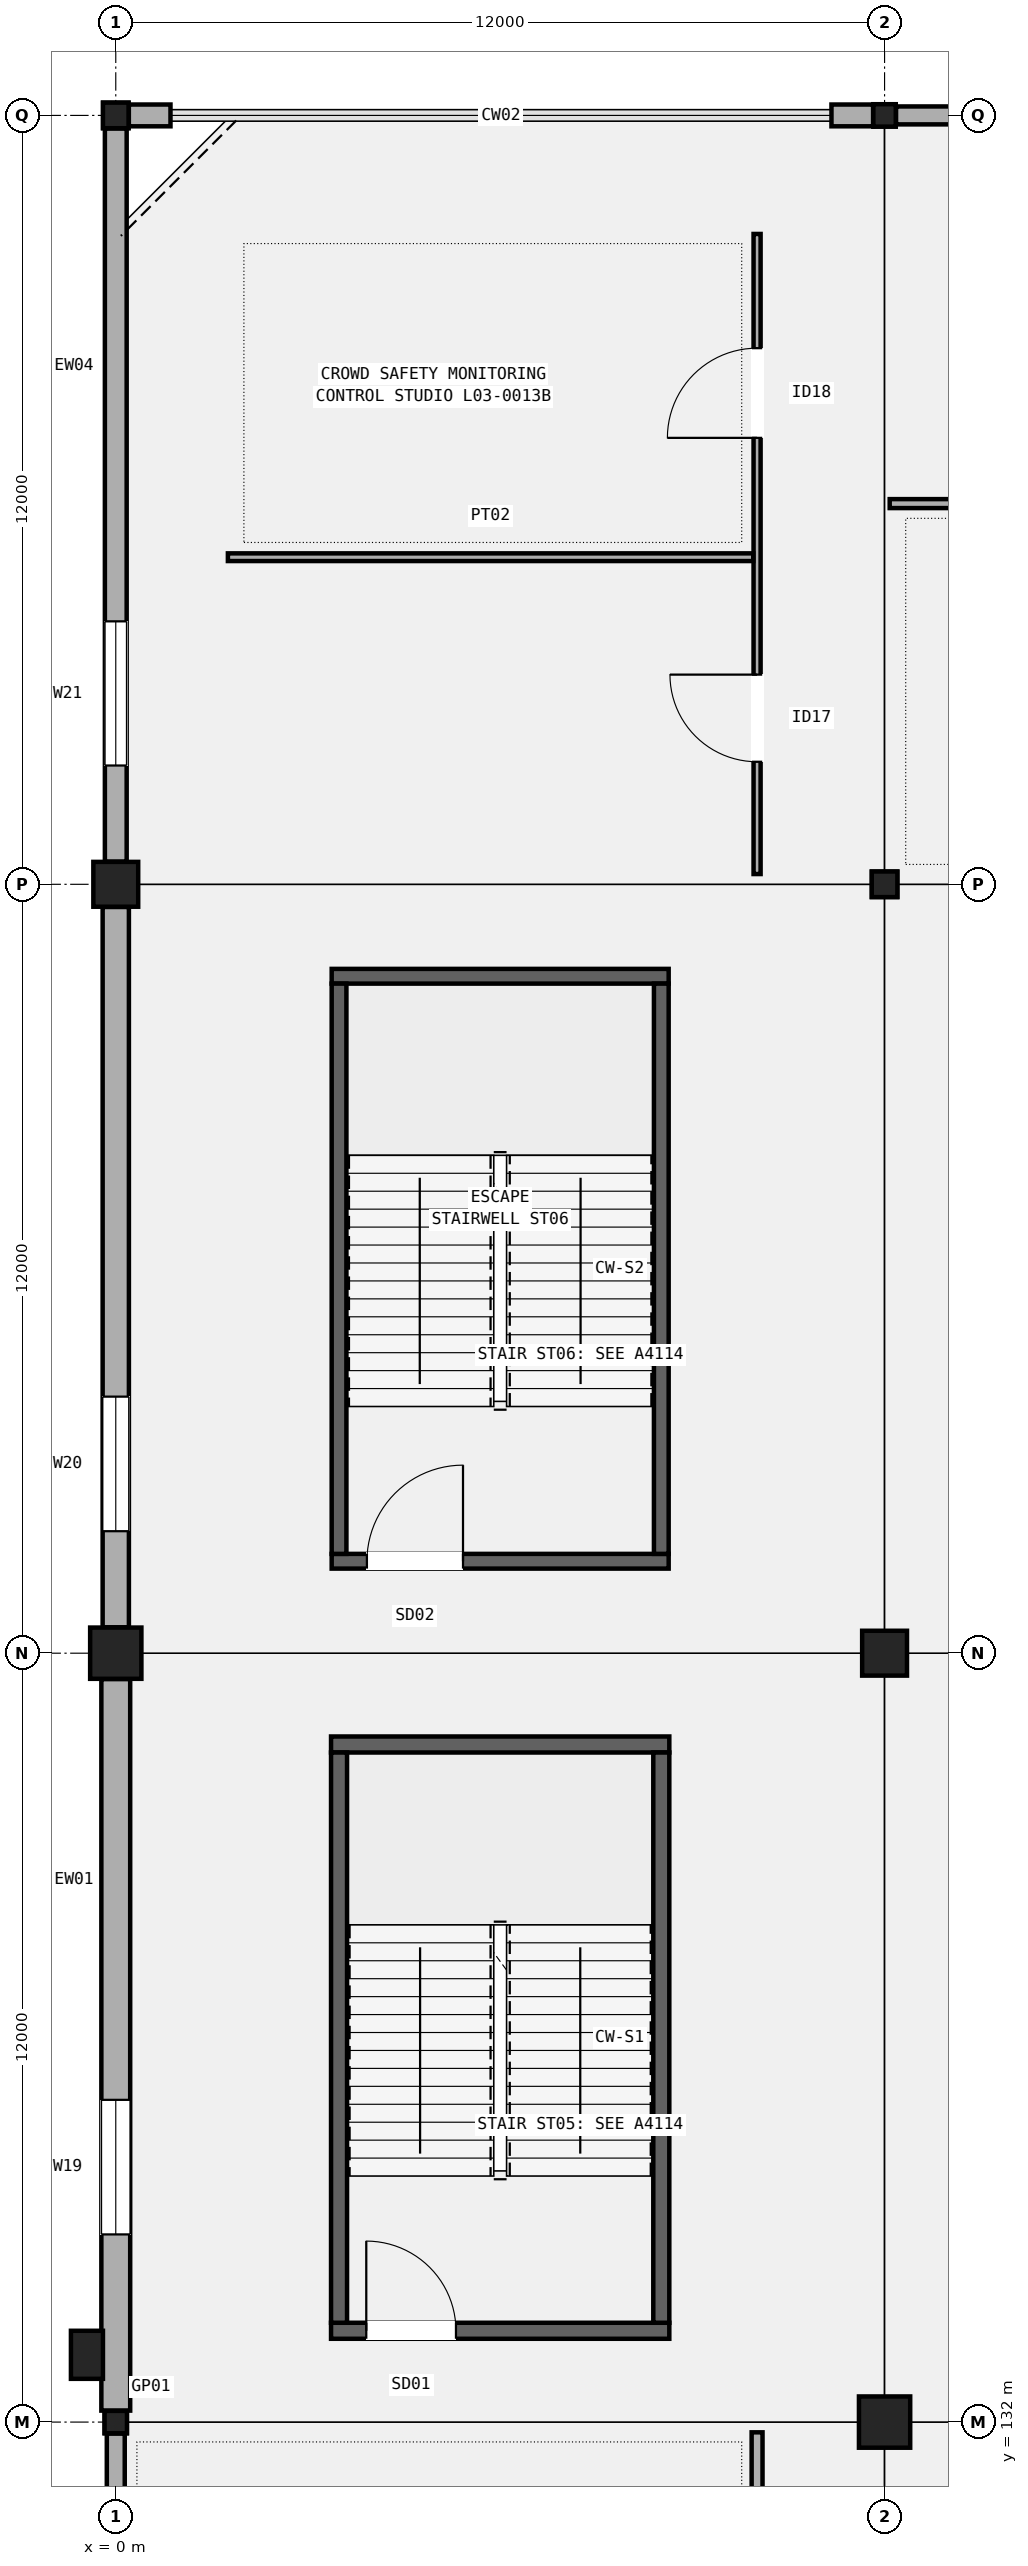
"""IFC4 building model, lengths in metres.
Left out: names, types, materials, properties, quantities, classifications, styles, units other than length and angle.
Written with IfcOpenShell. Run it as: python <this file> out.ifc"""

import sys

from ifc_helpers import new_model, si_unit, direction, frame, frame_2d, origin, origin_2d, place, context, subcontext, project, spatial, rectangle, hollow_rectangle, extrude, element, fill, save


model = new_model("IFC4")
c1 = context("Model", 3, precision=1e-05, world=origin(), true_north=direction((0.0, 1.0)))
c2 = subcontext(c1, "Body", "Model", "MODEL_VIEW")
j1 = project(units=[si_unit("LENGTHUNIT", "METRE"), si_unit("PLANEANGLEUNIT", "RADIAN")], contexts=[c1])
p1 = place(None, origin())
s1 = spatial("IfcSite", under=j1, at=p1, CompositionType="ELEMENT")
p2 = place(p1, origin())
s2 = spatial("IfcBuilding", under=s1, at=p2, CompositionType="ELEMENT")
p3 = place(p2, frame((0.0, 0.0, 15.3)))
s3 = spatial("IfcBuildingStorey", under=s2, at=p3, CompositionType="ELEMENT", Elevation=15.3)
p4 = place(p3, frame((0.0, 132.0, 0.0), z_axis=(0.0, 0.0, 1.0), x_axis=(1.0, 0.0, 0.0)))
e1 = element("IfcColumn", 1, at=p4, inside=s3, PredefinedType="COLUMN", context=c2, shape_type="SweptSolid", body=[
    extrude(hollow_rectangle(XDim=0.35, YDim=0.35, WallThickness=0.016, InnerFilletRadius=0.016, OuterFilletRadius=0.032, at=origin_2d()), origin(), (0.0, 0.0, 1.0), 5.1),
])
p5 = place(p3, frame((0.0, 144.0, 0.0), z_axis=(0.0, 0.0, 1.0), x_axis=(1.0, 0.0, 0.0)))
e2 = element("IfcColumn", 2, at=p5, inside=s3, PredefinedType="COLUMN", context=c2, shape_type="SweptSolid", body=[
    extrude(rectangle(XDim=0.8, YDim=0.8, at=origin_2d()), origin(), (0.0, 0.0, 1.0), 5.1),
])
p6 = place(p3, frame((0.0, 156.0, 0.0), z_axis=(0.0, 0.0, 1.0), x_axis=(1.0, 0.0, 0.0)))
e3 = element("IfcColumn", 3, at=p6, inside=s3, PredefinedType="COLUMN", context=c2, shape_type="SweptSolid", body=[
    extrude(rectangle(XDim=0.7, YDim=0.7, at=origin_2d()), origin(), (0.0, 0.0, 1.0), 5.1),
])
p7 = place(p3, frame((0.0, 168.0, 0.0), z_axis=(0.0, 0.0, 1.0), x_axis=(1.0, 0.0, 0.0)))
e4 = element("IfcColumn", 4, at=p7, inside=s3, PredefinedType="COLUMN", context=c2, shape_type="SweptSolid", body=[
    extrude(hollow_rectangle(XDim=0.4, YDim=0.4, WallThickness=0.016, InnerFilletRadius=0.016, OuterFilletRadius=0.032, at=origin_2d()), origin(), (0.0, 0.0, 1.0), 5.1),
])
p8 = place(p3, frame((12.0, 132.0, 0.0), z_axis=(0.0, 0.0, 1.0), x_axis=(1.0, 0.0, 0.0)))
e5 = element("IfcColumn", 5, at=p8, inside=s3, PredefinedType="COLUMN", context=c2, shape_type="SweptSolid", body=[
    extrude(rectangle(XDim=0.8, YDim=0.8, at=origin_2d()), origin(), (0.0, 0.0, 1.0), 5.1),
])
p9 = place(p3, frame((12.0, 144.0, 0.0), z_axis=(0.0, 0.0, 1.0), x_axis=(1.0, 0.0, 0.0)))
e6 = element("IfcColumn", 6, at=p9, inside=s3, PredefinedType="COLUMN", context=c2, shape_type="SweptSolid", body=[
    extrude(rectangle(XDim=0.7, YDim=0.7, at=origin_2d()), origin(), (0.0, 0.0, 1.0), 5.1),
])
p10 = place(p3, frame((12.0, 156.0, 0.0), z_axis=(0.0, 0.0, 1.0), x_axis=(1.0, 0.0, 0.0)))
e7 = element("IfcColumn", 7, at=p10, inside=s3, PredefinedType="COLUMN", context=c2, shape_type="SweptSolid", body=[
    extrude(hollow_rectangle(XDim=0.4, YDim=0.4, WallThickness=0.016, InnerFilletRadius=0.016, OuterFilletRadius=0.032, at=origin_2d()), origin(), (0.0, 0.0, 1.0), 5.1),
])
p11 = place(p3, frame((12.0, 168.0, 0.0), z_axis=(0.0, 0.0, 1.0), x_axis=(1.0, 0.0, 0.0)))
e8 = element("IfcColumn", 8, at=p11, inside=s3, PredefinedType="COLUMN", context=c2, shape_type="SweptSolid", body=[
    extrude(hollow_rectangle(XDim=0.35, YDim=0.35, WallThickness=0.016, InnerFilletRadius=0.016, OuterFilletRadius=0.032, at=origin_2d()), origin(), (0.0, 0.0, 1.0), 5.1),
])
p12 = place(p3, frame((-0.45, 133.05, 0.0), z_axis=(0.0, 0.0, 1.0), x_axis=(1.0, 0.0, 0.0)))
e9 = element("IfcColumn", 9, at=p12, inside=s3, PredefinedType="PILASTER", context=c2, shape_type="SweptSolid", body=[
    extrude(rectangle(XDim=0.5, YDim=0.75, at=origin_2d()), origin(), (0.0, 0.0, 1.0), 5.1),
])
p13 = place(p3, frame((0.0, 120.204, 0.0), z_axis=(0.0, 0.0, 1.0), x_axis=(0.0, 1.0, 0.0)))
e10 = element("IfcWall", 10, at=p13, inside=s3, PredefinedType="SOLIDWALL", context=c2, shape_type="SweptSolid", body=[
    extrude(rectangle(XDim=11.617, YDim=0.28, at=frame_2d((5.809, 0.0))), origin(), (0.0, 0.0, 1.0), 4.16),
])
p14 = place(p13, frame((1.5, 0.0, 0.95)))
e11 = element("IfcOpeningElement", 11, at=p14, cuts=e10, PredefinedType="OPENING", context=c2, shape_type="SweptSolid", body=[
    extrude(rectangle(XDim=2.1, YDim=1.85, at=frame_2d((1.05, 0.925))), frame((0.0, 0.15, 0.0), z_axis=(0.0, -1.0, 0.0), x_axis=(1.0, 0.0, 0.0)), (0.0, 0.0, 1.0), 0.3),
])
p15 = place(p3, frame((0.0, 132.179, 0.0), z_axis=(0.0, 0.0, 1.0), x_axis=(0.0, 1.0, 0.0)))
e12 = element("IfcWall", 12, at=p15, inside=s3, PredefinedType="SOLIDWALL", context=c2, shape_type="SweptSolid", body=[
    extrude(rectangle(XDim=11.417, YDim=0.45, at=frame_2d((5.708, 0.0))), origin(), (0.0, 0.0, 1.0), 4.172),
])
p16 = place(p15, frame((2.75, 0.0, 0.95)))
e13 = element("IfcOpeningElement", 13, at=p16, cuts=e12, PredefinedType="OPENING", context=c2, shape_type="SweptSolid", body=[
    extrude(rectangle(XDim=2.1, YDim=2.25, at=frame_2d((1.05, 1.125))), frame((0.0, 0.235, 0.0), z_axis=(0.0, -1.0, 0.0), x_axis=(1.0, 0.0, 0.0)), (0.0, 0.0, 1.0), 0.47),
])
p17 = place(p3, frame((0.0, 144.404, 0.0), z_axis=(0.0, 0.0, 1.0), x_axis=(0.0, 1.0, 0.0)))
e14 = element("IfcWall", 14, at=p17, inside=s3, PredefinedType="SOLIDWALL", context=c2, shape_type="SweptSolid", body=[
    extrude(rectangle(XDim=11.242, YDim=0.41, at=frame_2d((5.621, 0.0))), origin(), (0.0, 0.0, 1.0), 4.06),
])
p18 = place(p17, frame((1.5, 0.0, 0.95)))
e15 = element("IfcOpeningElement", 15, at=p18, cuts=e14, PredefinedType="OPENING", context=c2, shape_type="SweptSolid", body=[
    extrude(rectangle(XDim=2.1, YDim=2.6, at=frame_2d((1.05, 1.3))), frame((0.0, 0.215, 0.0), z_axis=(0.0, -1.0, 0.0), x_axis=(1.0, 0.0, 0.0)), (0.0, 0.0, 1.0), 0.43),
])
p19 = place(p3, frame((0.204, 168.0, 0.0), z_axis=(0.0, 0.0, 1.0), x_axis=(1.0, 0.0, 0.0)))
e16 = element("IfcWall", 16, at=p19, inside=s3, PredefinedType="SOLIDWALL", context=c2, shape_type="SweptSolid", body=[
    extrude(rectangle(XDim=0.65, YDim=0.34, at=frame_2d((0.325, 0.0))), origin(), (0.0, 0.0, 1.0), 4.172),
])
p20 = place(p3, frame((11.171, 168.0, 0.0), z_axis=(0.0, 0.0, 1.0), x_axis=(1.0, 0.0, 0.0)))
e17 = element("IfcWall", 17, at=p20, inside=s3, PredefinedType="SOLIDWALL", context=c2, shape_type="SweptSolid", body=[
    extrude(rectangle(XDim=0.65, YDim=0.34, at=frame_2d((0.325, 0.0))), origin(), (0.0, 0.0, 1.0), 4.172),
])
p21 = place(p3, frame((0.0, 156.354, 0.0), z_axis=(0.0, 0.0, 1.0), x_axis=(0.0, 1.0, 0.0)))
e18 = element("IfcWall", 18, at=p21, inside=s3, PredefinedType="SOLIDWALL", context=c2, shape_type="SweptSolid", body=[
    extrude(rectangle(XDim=11.442, YDim=0.34, at=frame_2d((5.721, 0.0))), origin(), (0.0, 0.0, 1.0), 4.16),
])
p22 = place(p21, frame((1.5, 0.0, 0.95)))
e19 = element("IfcOpeningElement", 19, at=p22, cuts=e18, PredefinedType="OPENING", context=c2, shape_type="SweptSolid", body=[
    extrude(rectangle(XDim=2.25, YDim=1.8, at=frame_2d((1.125, 0.9))), frame((0.0, 0.18, 0.0), z_axis=(0.0, -1.0, 0.0), x_axis=(1.0, 0.0, 0.0)), (0.0, 0.0, 1.0), 0.36),
])
p23 = place(p3, frame((12.179, 168.0, 0.0), z_axis=(0.0, 0.0, 1.0), x_axis=(1.0, 0.0, 0.0)))
e20 = element("IfcWall", 20, at=p23, inside=s3, PredefinedType="SOLIDWALL", context=c2, shape_type="SweptSolid", body=[
    extrude(rectangle(XDim=11.417, YDim=0.28, at=frame_2d((5.708, 0.0))), origin(), (0.0, 0.0, 1.0), 4.06),
])
p24 = place(p23, frame((1.5, 0.0, 0.95)))
e21 = element("IfcOpeningElement", 21, at=p24, cuts=e20, PredefinedType="OPENING", context=c2, shape_type="SweptSolid", body=[
    extrude(rectangle(XDim=2.25, YDim=2.2, at=frame_2d((1.125, 1.1))), frame((0.0, 0.15, 0.0), z_axis=(0.0, -1.0, 0.0), x_axis=(1.0, 0.0, 0.0)), (0.0, 0.0, 1.0), 0.3),
])
p25 = place(p3, frame((3.36, 133.425, 0.0), z_axis=(0.0, 0.0, 1.0), x_axis=(1.0, 0.0, 0.0)))
e22 = element("IfcWall", 22, at=p25, inside=s3, PredefinedType="SHEAR", context=c2, shape_type="SweptSolid", body=[
    extrude(rectangle(XDim=5.28, YDim=0.25, at=frame_2d((2.64, 0.0))), origin(), (0.0, 0.0, 1.0), 4.86),
])
p26 = place(p25, frame((0.55, 0.0, 0.0)))
e23 = element("IfcOpeningElement", 23, at=p26, cuts=e22, PredefinedType="OPENING", context=c2, shape_type="SweptSolid", body=[
    extrude(rectangle(XDim=1.4, YDim=2.15, at=frame_2d((0.7, 1.075))), frame((0.0, 0.135, 0.0), z_axis=(0.0, -1.0, 0.0), x_axis=(1.0, 0.0, 0.0)), (0.0, 0.0, 1.0), 0.27),
])
p27 = place(p3, frame((3.36, 142.575, 0.0), z_axis=(0.0, 0.0, 1.0), x_axis=(1.0, 0.0, 0.0)))
e24 = element("IfcWall", 24, at=p27, inside=s3, PredefinedType="SHEAR", context=c2, shape_type="SweptSolid", body=[
    extrude(rectangle(XDim=5.28, YDim=0.25, at=frame_2d((2.64, 0.0))), origin(), (0.0, 0.0, 1.0), 4.86),
])
for number, where, z_axis, x_axis in (
    (25, (3.485, 133.55, 0.0), (0.0, 0.0, 1.0), (0.0, 1.0, 0.0)),
    (26, (8.515, 133.55, 0.0), (0.0, 0.0, 1.0), (0.0, 1.0, 0.0)),
):
    element("IfcWall", number, at=place(p3, frame(where, z_axis=z_axis, x_axis=x_axis)), inside=s3, PredefinedType="SHEAR", context=c2, shape_type="SweptSolid", body=[
        extrude(rectangle(XDim=8.9, YDim=0.25, at=frame_2d((4.45, 0.0))), origin(), (0.0, 0.0, 1.0), 4.86),
    ])
p28 = place(p3, frame((3.37, 145.435, 0.0), z_axis=(0.0, 0.0, 1.0), x_axis=(1.0, 0.0, 0.0)))
e27 = element("IfcWall", 27, at=p28, inside=s3, PredefinedType="SHEAR", context=c2, shape_type="SweptSolid", body=[
    extrude(rectangle(XDim=5.26, YDim=0.23, at=frame_2d((2.63, 0.0))), origin(), (0.0, 0.0, 1.0), 4.86),
])
p29 = place(p28, frame((0.55, 0.0, 0.0)))
e28 = element("IfcOpeningElement", 28, at=p29, cuts=e27, PredefinedType="OPENING", context=c2, shape_type="SweptSolid", body=[
    extrude(rectangle(XDim=1.5, YDim=2.2, at=frame_2d((0.75, 1.1))), frame((0.0, 0.125, 0.0), z_axis=(0.0, -1.0, 0.0), x_axis=(1.0, 0.0, 0.0)), (0.0, 0.0, 1.0), 0.25),
])
p30 = place(p3, frame((3.37, 154.565, 0.0), z_axis=(0.0, 0.0, 1.0), x_axis=(1.0, 0.0, 0.0)))
e29 = element("IfcWall", 29, at=p30, inside=s3, PredefinedType="SHEAR", context=c2, shape_type="SweptSolid", body=[
    extrude(rectangle(XDim=5.26, YDim=0.23, at=frame_2d((2.63, 0.0))), origin(), (0.0, 0.0, 1.0), 4.86),
])
for number, where, z_axis, x_axis in (
    (30, (3.485, 145.55, 0.0), (0.0, 0.0, 1.0), (0.0, 1.0, 0.0)),
    (31, (8.515, 145.55, 0.0), (0.0, 0.0, 1.0), (0.0, 1.0, 0.0)),
):
    element("IfcWall", number, at=place(p3, frame(where, z_axis=z_axis, x_axis=x_axis)), inside=s3, PredefinedType="SHEAR", context=c2, shape_type="SweptSolid", body=[
        extrude(rectangle(XDim=8.9, YDim=0.23, at=frame_2d((4.45, 0.0))), origin(), (0.0, 0.0, 1.0), 4.86),
    ])
p31 = place(p3, frame((10.01, 120.16, 0.0), z_axis=(0.0, 0.0, 1.0), x_axis=(0.0, 1.0, 0.0)))
e32 = element("IfcWall", 32, at=p31, inside=s3, PredefinedType="PARTITIONING", context=c2, shape_type="SweptSolid", body=[
    extrude(rectangle(XDim=11.68, YDim=0.17, at=frame_2d((5.84, 0.0))), origin(), (0.0, 0.0, 1.0), 4.22),
])
p32 = place(p31, frame((5.175, 0.0, 0.0)))
e33 = element("IfcOpeningElement", 33, at=p32, cuts=e32, PredefinedType="OPENING", context=c2, shape_type="SweptSolid", body=[
    extrude(rectangle(XDim=1.33, YDim=2.22, at=frame_2d((0.665, 1.11))), frame((0.0, 0.095, 0.0), z_axis=(0.0, -1.0, 0.0), x_axis=(1.0, 0.0, 0.0)), (0.0, 0.0, 1.0), 0.19),
])
p33 = place(p3, frame((10.01, 156.16, 0.0), z_axis=(0.0, 0.0, 1.0), x_axis=(0.0, 1.0, 0.0)))
e34 = element("IfcWall", 34, at=p33, inside=s3, PredefinedType="PARTITIONING", context=c2, shape_type="SweptSolid", body=[
    extrude(rectangle(XDim=9.99, YDim=0.11, at=frame_2d((4.995, 0.0))), origin(), (0.0, 0.0, 1.0), 4.22),
])
p34 = place(p33, frame((1.752, 0.0, 0.0)))
e35 = element("IfcOpeningElement", 35, at=p34, cuts=e34, PredefinedType="OPENING", context=c2, shape_type="SweptSolid", body=[
    extrude(rectangle(XDim=1.36, YDim=2.25, at=frame_2d((0.68, 1.125))), frame((0.0, 0.065, 0.0), z_axis=(0.0, -1.0, 0.0), x_axis=(1.0, 0.0, 0.0)), (0.0, 0.0, 1.0), 0.13),
])
p35 = place(p33, frame((6.808, 0.0, 0.0)))
e36 = element("IfcOpeningElement", 36, at=p35, cuts=e34, PredefinedType="OPENING", context=c2, shape_type="SweptSolid", body=[
    extrude(rectangle(XDim=1.4, YDim=2.24, at=frame_2d((0.7, 1.12))), frame((0.0, 0.065, 0.0), z_axis=(0.0, -1.0, 0.0), x_axis=(1.0, 0.0, 0.0)), (0.0, 0.0, 1.0), 0.13),
])
p36 = place(p3, frame((1.75, 161.105, 0.0), z_axis=(0.0, 0.0, 1.0), x_axis=(1.0, 0.0, 0.0)))
e37 = element("IfcWall", 37, at=p36, inside=s3, PredefinedType="PARTITIONING", context=c2, shape_type="SweptSolid", body=[
    extrude(rectangle(XDim=8.2, YDim=0.12, at=frame_2d((4.1, 0.0))), origin(), (0.0, 0.0, 1.0), 4.22),
])
p37 = place(p3, frame((12.08, 161.942, 0.0), z_axis=(0.0, 0.0, 1.0), x_axis=(1.0, 0.0, 0.0)))
e38 = element("IfcWall", 38, at=p37, inside=s3, PredefinedType="PARTITIONING", context=c2, shape_type="SweptSolid", body=[
    extrude(rectangle(XDim=9.865, YDim=0.14, at=frame_2d((4.933, 0.0))), origin(), (0.0, 0.0, 1.0), 4.22),
])
p38 = place(p16, origin())
e39 = element("IfcWindow", 39, at=p38, inside=s3, PartitioningType="SINGLE_PANEL", PredefinedType="WINDOW", context=c2, shape_type="SweptSolid", body=[
    extrude(rectangle(XDim=2.1, YDim=2.25, at=frame_2d((1.05, 1.125))), frame((0.0, 0.03, 0.0), z_axis=(0.0, -1.0, 0.0), x_axis=(1.0, 0.0, 0.0)), (0.0, 0.0, 1.0), 0.06),
])
fill(e13, e39)
p39 = place(p18, origin())
e40 = element("IfcWindow", 40, at=p39, inside=s3, PartitioningType="SINGLE_PANEL", PredefinedType="WINDOW", context=c2, shape_type="SweptSolid", body=[
    extrude(rectangle(XDim=2.1, YDim=2.6, at=frame_2d((1.05, 1.3))), frame((0.0, 0.03, 0.0), z_axis=(0.0, -1.0, 0.0), x_axis=(1.0, 0.0, 0.0)), (0.0, 0.0, 1.0), 0.06),
])
fill(e15, e40)
p40 = place(p22, origin())
e41 = element("IfcWindow", 41, at=p40, inside=s3, PartitioningType="SINGLE_PANEL", PredefinedType="WINDOW", context=c2, shape_type="SweptSolid", body=[
    extrude(rectangle(XDim=2.25, YDim=1.8, at=frame_2d((1.125, 0.9))), frame((0.0, 0.03, 0.0), z_axis=(0.0, -1.0, 0.0), x_axis=(1.0, 0.0, 0.0)), (0.0, 0.0, 1.0), 0.06),
])
fill(e19, e41)
p41 = place(p26, origin())
e42 = element("IfcDoor", 42, at=p41, inside=s3, OperationType="SINGLE_SWING_LEFT", PredefinedType="DOOR", context=c2, shape_type="SweptSolid", body=[
    extrude(rectangle(XDim=1.4, YDim=2.15, at=frame_2d((0.7, 1.075))), frame((0.0, 0.025, 0.0), z_axis=(0.0, -1.0, 0.0), x_axis=(1.0, 0.0, 0.0)), (0.0, 0.0, 1.0), 0.05),
])
fill(e23, e42)
p42 = place(p29, origin())
e43 = element("IfcDoor", 43, at=p42, inside=s3, OperationType="SINGLE_SWING_RIGHT", PredefinedType="DOOR", context=c2, shape_type="SweptSolid", body=[
    extrude(rectangle(XDim=1.5, YDim=2.2, at=frame_2d((0.75, 1.1))), frame((0.0, 0.025, 0.0), z_axis=(0.0, -1.0, 0.0), x_axis=(1.0, 0.0, 0.0)), (0.0, 0.0, 1.0), 0.05),
])
fill(e28, e43)
p43 = place(p34, origin())
e44 = element("IfcDoor", 44, at=p43, inside=s3, OperationType="SINGLE_SWING_RIGHT", PredefinedType="DOOR", context=c2, shape_type="SweptSolid", body=[
    extrude(rectangle(XDim=1.36, YDim=2.25, at=frame_2d((0.68, 1.125))), frame((0.0, 0.025, 0.0), z_axis=(0.0, -1.0, 0.0), x_axis=(1.0, 0.0, 0.0)), (0.0, 0.0, 1.0), 0.05),
])
fill(e35, e44)
p44 = place(p35, origin())
e45 = element("IfcDoor", 45, at=p44, inside=s3, OperationType="SINGLE_SWING_LEFT", PredefinedType="DOOR", context=c2, shape_type="SweptSolid", body=[
    extrude(rectangle(XDim=1.4, YDim=2.24, at=frame_2d((0.7, 1.12))), frame((0.0, 0.025, 0.0), z_axis=(0.0, -1.0, 0.0), x_axis=(1.0, 0.0, 0.0)), (0.0, 0.0, 1.0), 0.05),
])
fill(e36, e45)
save(model, sys.argv[1])
